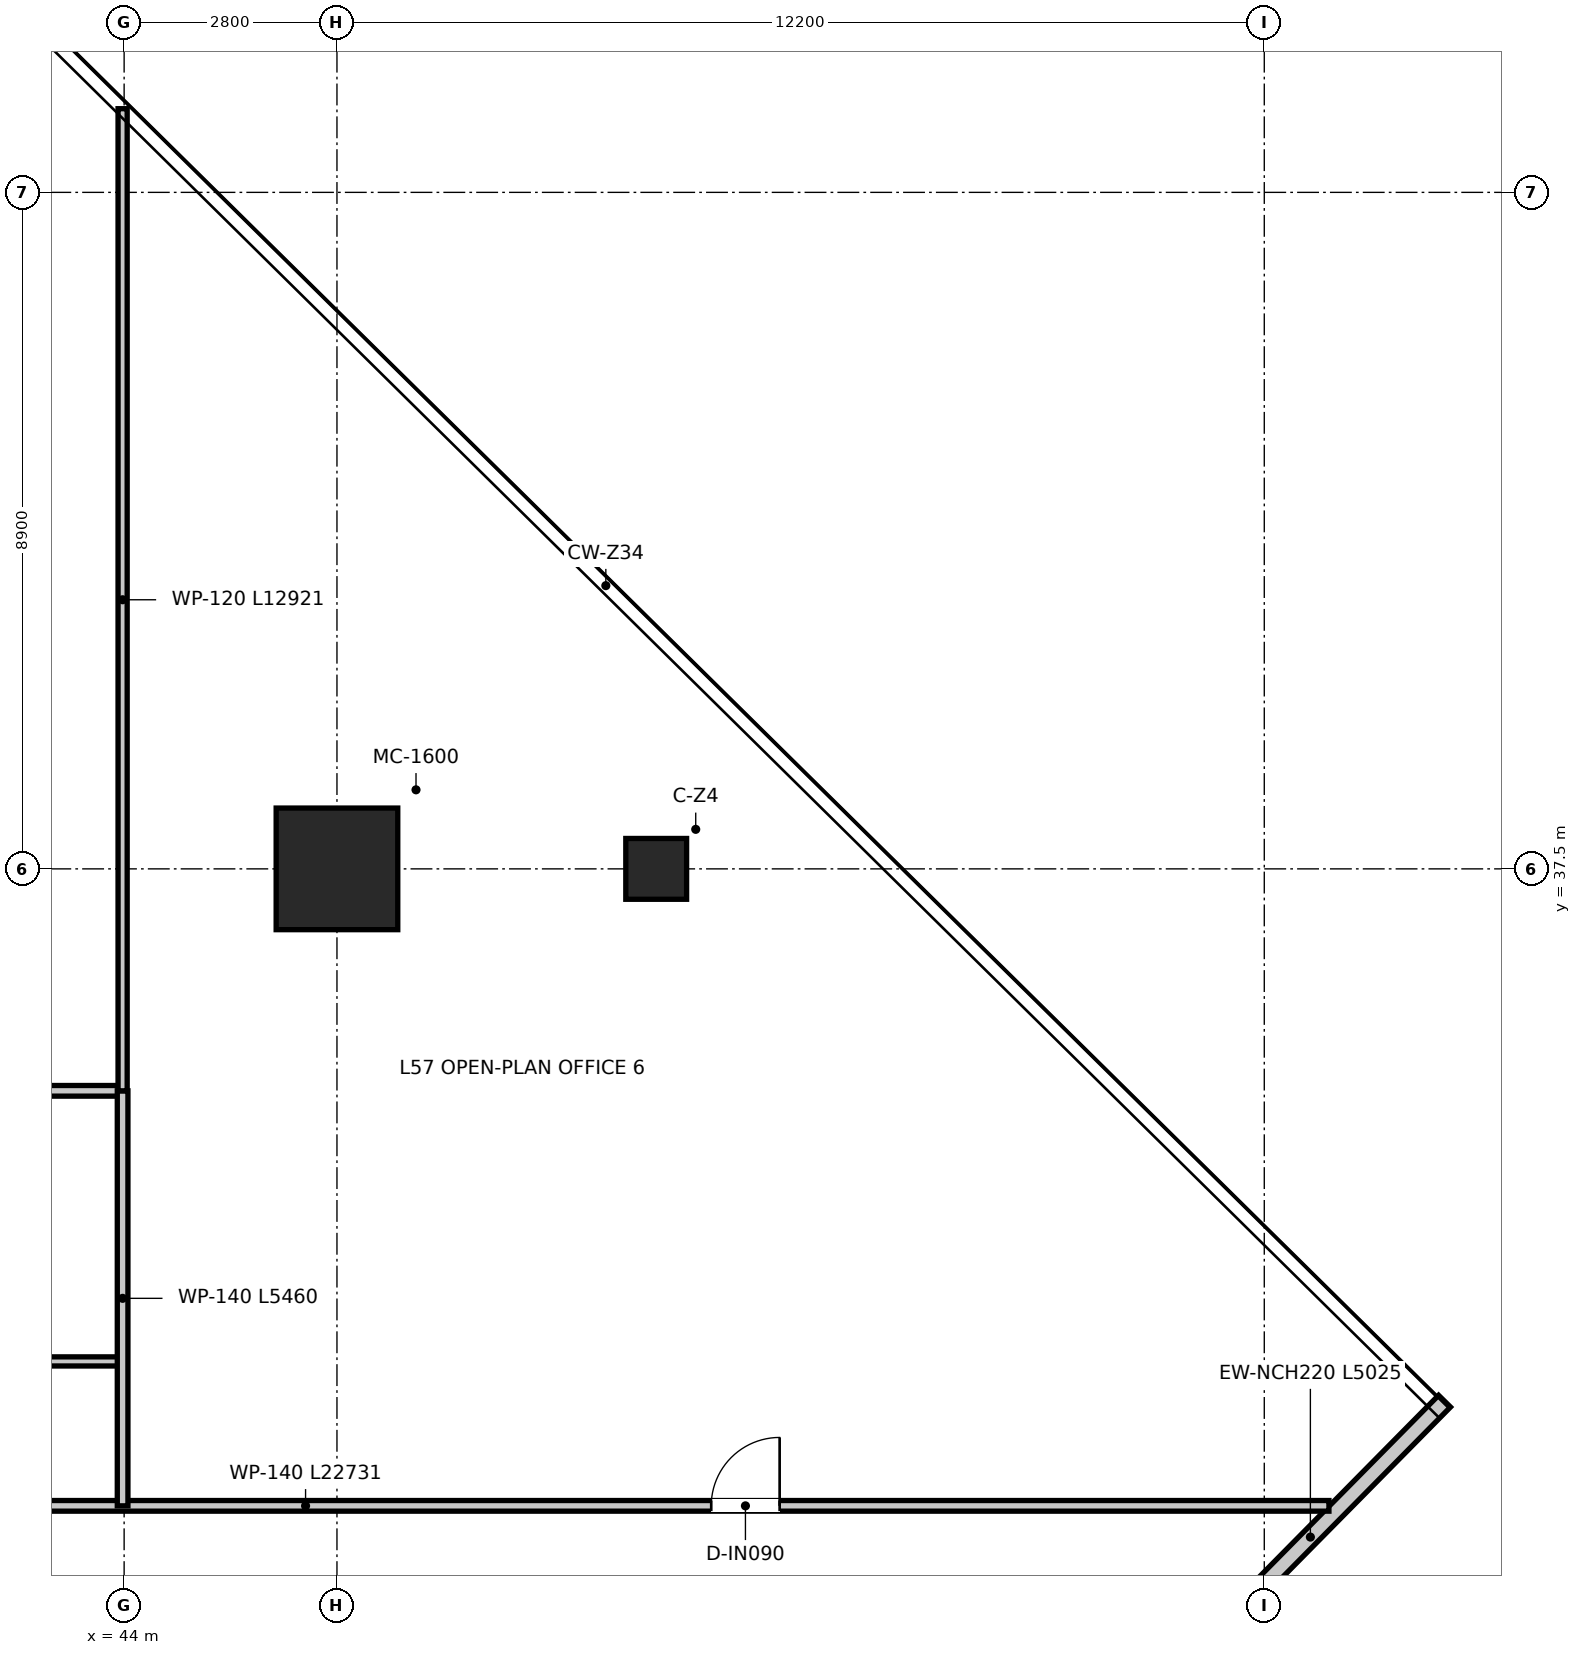
"""IFC4 building model, lengths in metres.
Left out: names, types, materials, properties, quantities, classifications, styles, units other than length and angle.
Written with IfcOpenShell. Run it as: python <this file> out.ifc"""

import sys

from ifc_helpers import new_model, si_unit, direction, frame, frame_2d, origin, origin_2d, place, context, subcontext, project, spatial, rectangle, extrude, source, transform, mapped, element, fill, save


model = new_model("IFC4")
c1 = context("Model", 3, precision=1e-05, world=origin(), true_north=direction((0.0, 1.0)))
c2 = subcontext(c1, "Body", "Model", "MODEL_VIEW")
j1 = project(units=[si_unit("LENGTHUNIT", "METRE"), si_unit("PLANEANGLEUNIT", "RADIAN")], contexts=[c1])
p1 = place(None, origin())
s1 = spatial("IfcSite", under=j1, at=p1, CompositionType="ELEMENT")
p2 = place(p1, origin())
s2 = spatial("IfcBuilding", under=s1, at=p2, CompositionType="ELEMENT")
p3 = place(p2, frame((0.0, 0.0, 234.95)))
s3 = spatial("IfcBuildingStorey", under=s2, at=p3, CompositionType="ELEMENT", Elevation=234.95)
m1 = source(origin(), c2, "Body", "SweptSolid", [
    extrude(rectangle(XDim=1.6, YDim=1.6, at=origin_2d()), origin(), (0.0, 0.0, 1.0), 3.95),
])
p4 = place(p3, frame((46.8, 37.5, 0.0), z_axis=(0.0, 0.0, 1.0), x_axis=(1.0, 0.0, 0.0)))
e1 = element("IfcColumn", 1, at=p4, inside=s3, PredefinedType="USERDEFINED", context=c2, shape_type="MappedRepresentation", body=[
    mapped(m1, transform((0.0, 0.0, 0.0), x_axis=(1.0, 0.0, 0.0), y_axis=(0.0, 1.0, 0.0), z_axis=(0.0, 0.0, 1.0), scale=1.0)),
])
m2 = source(origin(), c2, "Body", "SweptSolid", [
    extrude(rectangle(XDim=0.8, YDim=0.8, at=origin_2d()), origin(), (0.0, 0.0, 1.0), 3.95),
])
p5 = place(p3, frame((51.0, 37.5, 0.0), z_axis=(0.0, 0.0, 1.0), x_axis=(1.0, 0.0, 0.0)))
e2 = element("IfcColumn", 2, at=p5, inside=s3, PredefinedType="COLUMN", context=c2, shape_type="MappedRepresentation", body=[
    mapped(m2, transform((0.0, 0.0, 0.0), x_axis=(1.0, 0.0, 0.0), y_axis=(0.0, 1.0, 0.0), z_axis=(0.0, 0.0, 1.0), scale=1.0)),
])
p6 = place(p3, frame((57.842, 26.921, 0.0), z_axis=(0.0, 0.0, 1.0), x_axis=(0.702451626199, 0.711731489292, 0.0)))
e3 = element("IfcWall", 3, at=p6, inside=s3, PredefinedType="ELEMENTEDWALL", context=c2, shape_type="SweptSolid", body=[
    extrude(rectangle(XDim=5.025, YDim=0.22, at=frame_2d((2.512, 0.0))), origin(), (0.0, 0.0, 1.0), 3.67),
])
p7 = place(p3, frame((37.12, 29.12, 0.0), z_axis=(0.0, 0.0, 1.0), x_axis=(1.0, 0.0, 0.0)))
e4 = element("IfcWall", 4, at=p7, inside=s3, PredefinedType="PARTITIONING", context=c2, shape_type="SweptSolid", body=[
    extrude(rectangle(XDim=22.73, YDim=0.14, at=frame_2d((11.365, 0.0))), origin(), (0.0, 0.0, 1.0), 3.03),
])
p8 = place(p7, frame((3.03, 0.0, 0.0)))
e5 = element("IfcOpeningElement", 5, at=p8, cuts=e4, PredefinedType="OPENING", context=c2, shape_type="SweptSolid", body=[
    extrude(rectangle(XDim=0.9, YDim=2.1, at=frame_2d((0.45, 1.05))), frame((0.0, 0.08, 0.0), z_axis=(0.0, -1.0, 0.0), x_axis=(1.0, 0.0, 0.0)), (0.0, 0.0, 1.0), 0.16),
])
p9 = place(p7, frame((14.604, 0.0, 0.0)))
e6 = element("IfcOpeningElement", 6, at=p9, cuts=e4, PredefinedType="OPENING", context=c2, shape_type="SweptSolid", body=[
    extrude(rectangle(XDim=0.9, YDim=2.1, at=frame_2d((0.45, 1.05))), frame((0.0, 0.08, 0.0), z_axis=(0.0, -1.0, 0.0), x_axis=(1.0, 0.0, 0.0)), (0.0, 0.0, 1.0), 0.16),
])
p10 = place(p3, frame((37.12, 31.02, 0.0), z_axis=(0.0, 0.0, 1.0), x_axis=(1.0, 0.0, 0.0)))
e7 = element("IfcWall", 7, at=p10, inside=s3, PredefinedType="PARTITIONING", context=c2, shape_type="SweptSolid", body=[
    extrude(rectangle(XDim=6.86, YDim=0.12, at=frame_2d((3.43, 0.0))), origin(), (0.0, 0.0, 1.0), 3.18),
])
p11 = place(p3, frame((37.12, 34.58, 0.0), z_axis=(0.0, 0.0, 1.0), x_axis=(1.0, 0.0, 0.0)))
e8 = element("IfcWall", 8, at=p11, inside=s3, PredefinedType="PARTITIONING", context=c2, shape_type="SweptSolid", body=[
    extrude(rectangle(XDim=6.86, YDim=0.14, at=frame_2d((3.43, 0.0))), origin(), (0.0, 0.0, 1.0), 3.18),
])
p12 = place(p3, frame((43.98, 29.12, 0.0), z_axis=(0.0, 0.0, 1.0), x_axis=(0.0, 1.0, 0.0)))
e9 = element("IfcWall", 9, at=p12, inside=s3, PredefinedType="PARTITIONING", context=c2, shape_type="SweptSolid", body=[
    extrude(rectangle(XDim=5.46, YDim=0.14, at=frame_2d((2.73, 0.0))), origin(), (0.0, 0.0, 1.0), 3.37),
])
p13 = place(p3, frame((43.98, 34.58, 0.0), z_axis=(0.0, 0.0, 1.0), x_axis=(0.0, 1.0, 0.0)))
e10 = element("IfcWall", 10, at=p13, inside=s3, PredefinedType="PARTITIONING", context=c2, shape_type="SweptSolid", body=[
    extrude(rectangle(XDim=12.921, YDim=0.12, at=frame_2d((6.46, 0.0))), origin(), (0.0, 0.0, 1.0), 3.03),
])
p14 = place(p9, origin())
e11 = element("IfcDoor", 11, at=p14, inside=s3, OperationType="SINGLE_SWING_RIGHT", PredefinedType="DOOR", context=c2, shape_type="SweptSolid", body=[
    extrude(rectangle(XDim=0.9, YDim=2.1, at=frame_2d((0.45, 1.05))), frame((0.0, 0.025, 0.0), z_axis=(0.0, -1.0, 0.0), x_axis=(1.0, 0.0, 0.0)), (0.0, 0.0, 1.0), 0.05),
])
fill(e6, e11)
save(model, sys.argv[1])
